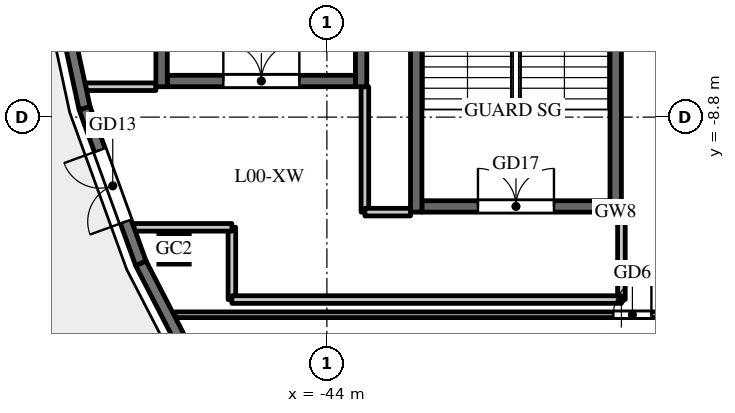
"""IFC4 building model, lengths in metres.
Left out: names, types, materials, properties, quantities, classifications, styles, units other than length and angle.
Written with IfcOpenShell. Run it as: python <this file> out.ifc"""

import sys

from ifc_helpers import new_model, si_unit, direction, frame, frame_2d, origin, origin_2d, place, context, subcontext, project, spatial, rectangle, hollow_rectangle, extrude, element, fill, save


model = new_model("IFC4")
c1 = context("Model", 3, precision=1e-05, world=origin(), true_north=direction((0.0, 1.0)))
c2 = subcontext(c1, "Body", "Model", "MODEL_VIEW")
j1 = project(units=[si_unit("LENGTHUNIT", "METRE"), si_unit("PLANEANGLEUNIT", "RADIAN")], contexts=[c1])
p1 = place(None, origin())
s1 = spatial("IfcSite", under=j1, at=p1, CompositionType="ELEMENT")
p2 = place(p1, origin())
s2 = spatial("IfcBuilding", under=s1, at=p2, CompositionType="ELEMENT")
p3 = place(p2, origin())
s3 = spatial("IfcBuildingStorey", under=s2, at=p3, CompositionType="ELEMENT", Elevation=0.0)
p4 = place(p3, frame((-48.022, -12.267, 0.0), z_axis=(0.0, 0.0, 1.0), x_axis=(1.0, 0.0, 0.0)))
e1 = element("IfcColumn", 1, at=p4, inside=s3, PredefinedType="COLUMN", context=c2, shape_type="SweptSolid", body=[
    extrude(hollow_rectangle(XDim=0.8, YDim=0.8, WallThickness=0.04, at=origin_2d()), origin(), (0.0, 0.0, 1.0), 7.5),
])
p5 = place(p3, frame((-47.997, -14.0, 0.0), z_axis=(0.0, 0.0, 1.0), x_axis=(1.0, 0.0, 0.0)))
e2 = element("IfcWall", 2, at=p5, inside=s3, PredefinedType="PARTITIONING", context=c2, shape_type="SweptSolid", body=[
    extrude(rectangle(XDim=24.072, YDim=0.15, at=frame_2d((12.036, 0.0))), origin(), (0.0, 0.0, 1.0), 6.25),
])
p6 = place(p5, frame((11.536, 0.0, 0.0)))
e3 = element("IfcOpeningElement", 3, at=p6, cuts=e2, PredefinedType="OPENING", context=c2, shape_type="SweptSolid", body=[
    extrude(rectangle(XDim=1.0, YDim=2.1, at=frame_2d((0.5, 1.05))), frame((0.0, 0.085, 0.0), z_axis=(0.0, -1.0, 0.0), x_axis=(1.0, 0.0, 0.0)), (0.0, 0.0, 1.0), 0.17),
])
p7 = place(p3, frame((-51.29, -4.326, 0.0), z_axis=(0.0, 0.0, 1.0), x_axis=(0.210616468766, -0.977568771537, 0.0)))
e4 = element("IfcWall", 4, at=p7, inside=s3, PredefinedType="SOLIDWALL", context=c2, shape_type="SweptSolid", body=[
    extrude(rectangle(XDim=4.339, YDim=0.3, at=frame_2d((2.169, 0.0))), origin(), (0.0, 0.0, 1.0), 7.25),
])
p8 = place(p7, frame((0.669, 0.0, 0.0)))
e5 = element("IfcOpeningElement", 5, at=p8, cuts=e4, PredefinedType="OPENING", context=c2, shape_type="SweptSolid", body=[
    extrude(rectangle(XDim=3.0, YDim=3.6, at=frame_2d((1.5, 1.8))), frame((0.0, 0.16, 0.0), z_axis=(0.0, -1.0, 0.0), x_axis=(1.0, 0.0, 0.0)), (0.0, 0.0, 1.0), 0.32),
])
p9 = place(p3, frame((-50.376, -8.568, 0.0), z_axis=(0.0, 0.0, 1.0), x_axis=(0.341286990045, -0.939959142956, 0.0)))
e6 = element("IfcWall", 6, at=p9, inside=s3, PredefinedType="SOLIDWALL", context=c2, shape_type="SweptSolid", body=[
    extrude(rectangle(XDim=4.342, YDim=0.3, at=frame_2d((2.171, 0.0))), origin(), (0.0, 0.0, 1.0), 7.25),
])
p10 = place(p9, frame((1.171, 0.0, 0.0)))
e7 = element("IfcOpeningElement", 7, at=p10, cuts=e6, PredefinedType="OPENING", context=c2, shape_type="SweptSolid", body=[
    extrude(rectangle(XDim=2.0, YDim=2.4, at=frame_2d((1.0, 1.2))), frame((0.0, 0.16, 0.0), z_axis=(0.0, -1.0, 0.0), x_axis=(1.0, 0.0, 0.0)), (0.0, 0.0, 1.0), 0.32),
])
p11 = place(p3, frame((-48.894, -12.649, 0.0), z_axis=(0.0, 0.0, 1.0), x_axis=(0.459242531468, -0.888310923771, 0.0)))
e8 = element("IfcWall", 8, at=p11, inside=s3, PredefinedType="SOLIDWALL", context=c2, shape_type="SweptSolid", body=[
    extrude(rectangle(XDim=4.345, YDim=0.3, at=frame_2d((2.172, 0.0))), origin(), (0.0, 0.0, 1.0), 7.25),
])
p12 = place(p11, frame((0.673, 0.0, 0.0)))
e9 = element("IfcOpeningElement", 9, at=p12, cuts=e8, PredefinedType="OPENING", context=c2, shape_type="SweptSolid", body=[
    extrude(rectangle(XDim=3.0, YDim=3.6, at=frame_2d((1.5, 1.8))), frame((0.0, 0.16, 0.0), z_axis=(0.0, -1.0, 0.0), x_axis=(1.0, 0.0, 0.0)), (0.0, 0.0, 1.0), 0.32),
])
for number, where, z_axis, x_axis in (
    (10, (-41.65, -11.3, 0.0), (0.0, 0.0, 1.0), (0.0, 1.0, 0.0)),
    (11, (-36.4, -11.3, 0.0), (0.0, 0.0, 1.0), (0.0, 1.0, 0.0)),
):
    element("IfcWall", number, at=place(p3, frame(where, z_axis=z_axis, x_axis=x_axis)), inside=s3, PredefinedType="SHEAR", context=c2, shape_type="SweptSolid", body=[
        extrude(rectangle(XDim=11.0, YDim=0.3, at=frame_2d((5.5, 0.0))), origin(), (0.0, 0.0, 1.0), 7.25),
    ])
p13 = place(p3, frame((-41.5, -11.15, 0.0), z_axis=(0.0, 0.0, 1.0), x_axis=(1.0, 0.0, 0.0)))
e12 = element("IfcWall", 12, at=p13, inside=s3, PredefinedType="SHEAR", context=c2, shape_type="SweptSolid", body=[
    extrude(rectangle(XDim=4.95, YDim=0.3, at=frame_2d((2.475, 0.0))), origin(), (0.0, 0.0, 1.0), 7.25),
])
p14 = place(p13, frame((1.475, 0.0, 0.0)))
e13 = element("IfcOpeningElement", 13, at=p14, cuts=e12, PredefinedType="OPENING", context=c2, shape_type="SweptSolid", body=[
    extrude(rectangle(XDim=2.0, YDim=2.1, at=frame_2d((1.0, 1.05))), frame((0.0, 0.16, 0.0), z_axis=(0.0, -1.0, 0.0), x_axis=(1.0, 0.0, 0.0)), (0.0, 0.0, 1.0), 0.32),
])
for number, where, z_axis, x_axis in (
    (14, (-48.35, -8.0, 0.0), (0.0, 0.0, 1.0), (0.0, 1.0, 0.0)),
    (15, (-43.1, -8.0, 0.0), (0.0, 0.0, 1.0), (0.0, 1.0, 0.0)),
):
    element("IfcWall", number, at=place(p3, frame(where, z_axis=z_axis, x_axis=x_axis)), inside=s3, PredefinedType="SHEAR", context=c2, shape_type="SweptSolid", body=[
        extrude(rectangle(XDim=11.0, YDim=0.3, at=frame_2d((5.5, 0.0))), origin(), (0.0, 0.0, 1.0), 7.25),
    ])
p15 = place(p3, frame((-48.2, -7.85, 0.0), z_axis=(0.0, 0.0, 1.0), x_axis=(1.0, 0.0, 0.0)))
e16 = element("IfcWall", 16, at=p15, inside=s3, PredefinedType="SHEAR", context=c2, shape_type="SweptSolid", body=[
    extrude(rectangle(XDim=4.95, YDim=0.3, at=frame_2d((2.475, 0.0))), origin(), (0.0, 0.0, 1.0), 7.25),
])
p16 = place(p15, frame((1.475, 0.0, 0.0)))
e17 = element("IfcOpeningElement", 17, at=p16, cuts=e16, PredefinedType="OPENING", context=c2, shape_type="SweptSolid", body=[
    extrude(rectangle(XDim=2.0, YDim=2.1, at=frame_2d((1.0, 1.05))), frame((0.0, 0.16, 0.0), z_axis=(0.0, -1.0, 0.0), x_axis=(1.0, 0.0, 0.0)), (0.0, 0.0, 1.0), 0.32),
])
p17 = place(p3, frame((-46.5, -13.6, 0.0), z_axis=(0.0, 0.0, 1.0), x_axis=(0.0, 1.0, 0.0)))
e18 = element("IfcWall", 18, at=p17, inside=s3, PredefinedType="PARTITIONING", context=c2, shape_type="SweptSolid", body=[
    extrude(rectangle(XDim=1.9, YDim=0.2, at=frame_2d((0.95, 0.0))), origin(), (0.0, 0.0, 1.0), 6.25),
])
p18 = place(p3, frame((-46.5, -11.7, 0.0), z_axis=(0.0, 0.0, 1.0), x_axis=(-1.0, 0.0, 0.0)))
e19 = element("IfcWall", 19, at=p18, inside=s3, PredefinedType="PARTITIONING", context=c2, shape_type="SweptSolid", body=[
    extrude(rectangle(XDim=2.579, YDim=0.2, at=frame_2d((1.29, 0.0))), origin(), (0.0, 0.0, 1.0), 6.25),
])
p19 = place(p3, frame((-50.345, -8.0, 0.0), z_axis=(0.0, 0.0, 1.0), x_axis=(1.0, 0.0, 0.0)))
e20 = element("IfcWall", 20, at=p19, inside=s3, PredefinedType="PARTITIONING", context=c2, shape_type="SweptSolid", body=[
    extrude(rectangle(XDim=1.845, YDim=0.2, at=frame_2d((0.922, 0.0))), origin(), (0.0, 0.0, 1.0), 6.65),
])
p20 = place(p3, frame((-43.0, -8.0, 0.0), z_axis=(0.0, 0.0, 1.0), x_axis=(0.0, -1.0, 0.0)))
e21 = element("IfcWall", 21, at=p20, inside=s3, PredefinedType="PARTITIONING", context=c2, shape_type="SweptSolid", body=[
    extrude(rectangle(XDim=3.3, YDim=0.2, at=frame_2d((1.65, 0.0))), origin(), (0.0, 0.0, 1.0), 6.25),
])
p21 = place(p3, frame((-43.0, -11.3, 0.0), z_axis=(0.0, 0.0, 1.0), x_axis=(1.0, 0.0, 0.0)))
e22 = element("IfcWall", 22, at=p21, inside=s3, PredefinedType="PARTITIONING", context=c2, shape_type="SweptSolid", body=[
    extrude(rectangle(XDim=1.2, YDim=0.2, at=frame_2d((0.6, 0.0))), origin(), (0.0, 0.0, 1.0), 6.25),
])
p22 = place(p3, frame((-36.25, -11.3, 0.0), z_axis=(0.0, 0.0, 1.0), x_axis=(0.0, -1.0, 0.0)))
e23 = element("IfcWall", 23, at=p22, inside=s3, PredefinedType="PARTITIONING", context=c2, shape_type="SweptSolid", body=[
    extrude(rectangle(XDim=2.3, YDim=0.2, at=frame_2d((1.15, 0.0))), origin(), (0.0, 0.0, 1.0), 7.25),
])
p23 = place(p3, frame((-36.25, -13.6, 0.0), z_axis=(0.0, 0.0, 1.0), x_axis=(-1.0, 0.0, 0.0)))
e24 = element("IfcWall", 24, at=p23, inside=s3, PredefinedType="PARTITIONING", context=c2, shape_type="SweptSolid", body=[
    extrude(rectangle(XDim=10.25, YDim=0.2, at=frame_2d((5.125, 0.0))), origin(), (0.0, 0.0, 1.0), 6.75),
])
p24 = place(p6, origin())
e25 = element("IfcDoor", 25, at=p24, inside=s3, OperationType="SINGLE_SWING_RIGHT", PredefinedType="DOOR", context=c2, shape_type="SweptSolid", body=[
    extrude(rectangle(XDim=1.0, YDim=2.1, at=frame_2d((0.5, 1.05))), frame((0.0, 0.025, 0.0), z_axis=(0.0, -1.0, 0.0), x_axis=(1.0, 0.0, 0.0)), (0.0, 0.0, 1.0), 0.05),
])
fill(e3, e25)
p25 = place(p8, origin())
e26 = element("IfcWindow", 26, at=p25, inside=s3, PartitioningType="SINGLE_PANEL", PredefinedType="WINDOW", context=c2, shape_type="SweptSolid", body=[
    extrude(rectangle(XDim=3.0, YDim=3.6, at=frame_2d((1.5, 1.8))), frame((0.0, 0.03, 0.0), z_axis=(0.0, -1.0, 0.0), x_axis=(1.0, 0.0, 0.0)), (0.0, 0.0, 1.0), 0.06),
])
fill(e5, e26)
p26 = place(p10, frame((2.0, 0.0, 0.0), z_axis=(0.0, 0.0, 1.0), x_axis=(-1.0, 0.0, 0.0)))
e27 = element("IfcDoor", 27, at=p26, inside=s3, OperationType="DOUBLE_DOOR_SINGLE_SWING", PredefinedType="DOOR", context=c2, shape_type="SweptSolid", body=[
    extrude(rectangle(XDim=2.0, YDim=2.4, at=frame_2d((1.0, 1.2))), frame((0.0, 0.025, 0.0), z_axis=(0.0, -1.0, 0.0), x_axis=(1.0, 0.0, 0.0)), (0.0, 0.0, 1.0), 0.05),
])
fill(e7, e27)
p27 = place(p12, origin())
e28 = element("IfcWindow", 28, at=p27, inside=s3, PartitioningType="SINGLE_PANEL", PredefinedType="WINDOW", context=c2, shape_type="SweptSolid", body=[
    extrude(rectangle(XDim=3.0, YDim=3.6, at=frame_2d((1.5, 1.8))), frame((0.0, 0.03, 0.0), z_axis=(0.0, -1.0, 0.0), x_axis=(1.0, 0.0, 0.0)), (0.0, 0.0, 1.0), 0.06),
])
fill(e9, e28)
p28 = place(p14, origin())
e29 = element("IfcDoor", 29, at=p28, inside=s3, OperationType="DOUBLE_DOOR_SINGLE_SWING", PredefinedType="DOOR", context=c2, shape_type="SweptSolid", body=[
    extrude(rectangle(XDim=2.0, YDim=2.1, at=frame_2d((1.0, 1.05))), frame((0.0, 0.025, 0.0), z_axis=(0.0, -1.0, 0.0), x_axis=(1.0, 0.0, 0.0)), (0.0, 0.0, 1.0), 0.05),
])
fill(e13, e29)
p29 = place(p16, origin())
e30 = element("IfcDoor", 30, at=p29, inside=s3, OperationType="DOUBLE_DOOR_SINGLE_SWING", PredefinedType="DOOR", context=c2, shape_type="SweptSolid", body=[
    extrude(rectangle(XDim=2.0, YDim=2.1, at=frame_2d((1.0, 1.05))), frame((0.0, 0.025, 0.0), z_axis=(0.0, -1.0, 0.0), x_axis=(1.0, 0.0, 0.0)), (0.0, 0.0, 1.0), 0.05),
])
fill(e17, e30)
save(model, sys.argv[1])
